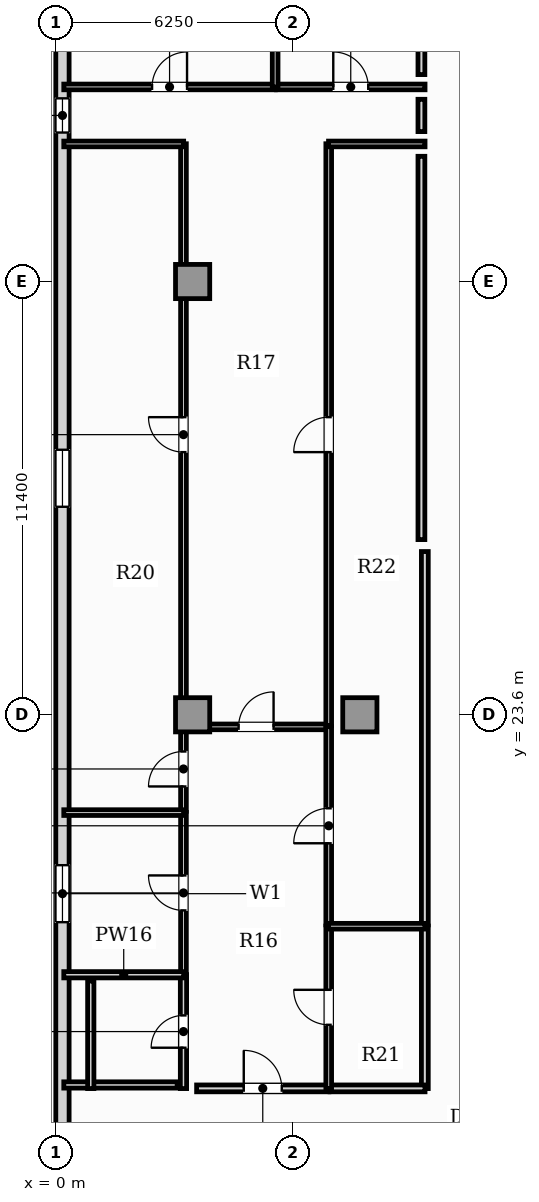
"""IFC4 building model, lengths in metres.
Left out: names, types, materials, properties, quantities, classifications, styles, units other than length and angle.
Written with IfcOpenShell. Run it as: python <this file> out.ifc"""

import sys

from ifc_helpers import new_model, si_unit, direction, frame, frame_2d, origin, origin_2d, place, context, subcontext, project, spatial, rectangle, extrude, element, fill, save


model = new_model("IFC4")
c1 = context("Model", 3, precision=1e-05, world=origin(), true_north=direction((0.0, 1.0)))
c2 = subcontext(c1, "Body", "Model", "MODEL_VIEW")
j1 = project(units=[si_unit("LENGTHUNIT", "METRE"), si_unit("PLANEANGLEUNIT", "RADIAN")], contexts=[c1])
p1 = place(None, origin())
s1 = spatial("IfcSite", under=j1, at=p1, CompositionType="ELEMENT")
p2 = place(p1, origin())
s2 = spatial("IfcBuilding", under=s1, at=p2, CompositionType="ELEMENT")
p3 = place(p2, frame((0.0, 0.0, 81.05)))
s3 = spatial("IfcBuildingStorey", under=s2, at=p3, CompositionType="ELEMENT", Elevation=81.05)
for number, where, z_axis, x_axis in (
    (1, (3.6, 23.6, 0.0), (0.0, 0.0, 1.0), (1.0, 0.0, 0.0)),
    (2, (8.0, 23.6, 0.0), (0.0, 0.0, 1.0), (1.0, 0.0, 0.0)),
    (3, (3.6, 35.0, 0.0), (0.0, 0.0, 1.0), (1.0, 0.0, 0.0)),
):
    element("IfcColumn", number, at=place(p3, frame(where, z_axis=z_axis, x_axis=x_axis)), inside=s3, PredefinedType="COLUMN", context=c2, shape_type="SweptSolid", body=[
        extrude(rectangle(XDim=0.9, YDim=0.9, at=origin_2d()), origin(), (0.0, 0.0, 1.0), 3.85),
    ])
p4 = place(p3, frame((0.175, 43.16, 0.0), z_axis=(0.0, 0.0, 1.0), x_axis=(0.0, -1.0, 0.0)))
e4 = element("IfcWall", 4, at=p4, inside=s3, PredefinedType="SOLIDWALL", context=c2, shape_type="SweptSolid", body=[
    extrude(rectangle(XDim=39.92, YDim=0.35, at=frame_2d((19.96, 0.0))), origin(), (0.0, 0.0, 1.0), 3.6),
])
p5 = place(p4, frame((3.34, 0.0, 0.95)))
e5 = element("IfcOpeningElement", 5, at=p5, cuts=e4, PredefinedType="OPENING", context=c2, shape_type="SweptSolid", body=[
    extrude(rectangle(XDim=0.9, YDim=1.5, at=frame_2d((0.45, 0.75))), frame((0.0, 0.185, 0.0), z_axis=(0.0, -1.0, 0.0), x_axis=(1.0, 0.0, 0.0)), (0.0, 0.0, 1.0), 0.37),
])
p6 = place(p4, frame((23.517, 0.0, 0.9)))
e6 = element("IfcOpeningElement", 6, at=p6, cuts=e4, PredefinedType="OPENING", context=c2, shape_type="SweptSolid", body=[
    extrude(rectangle(XDim=1.5, YDim=1.95, at=frame_2d((0.75, 0.975))), frame((0.0, 0.185, 0.0), z_axis=(0.0, -1.0, 0.0), x_axis=(1.0, 0.0, 0.0)), (0.0, 0.0, 1.0), 0.37),
])
p7 = place(p4, frame((12.587, 0.0, 0.9)))
e7 = element("IfcOpeningElement", 7, at=p7, cuts=e4, PredefinedType="OPENING", context=c2, shape_type="SweptSolid", body=[
    extrude(rectangle(XDim=1.5, YDim=1.95, at=frame_2d((0.75, 0.975))), frame((0.0, 0.185, 0.0), z_axis=(0.0, -1.0, 0.0), x_axis=(1.0, 0.0, 0.0)), (0.0, 0.0, 1.0), 0.37),
])
p8 = place(p3, frame((3.705, 13.77, 0.0), z_axis=(0.0, 0.0, 1.0), x_axis=(1.0, 0.0, 0.0)))
e8 = element("IfcWall", 8, at=p8, inside=s3, PredefinedType="PARTITIONING", context=c2, shape_type="SweptSolid", body=[
    extrude(rectangle(XDim=3.481, YDim=0.18, at=frame_2d((1.74, 0.0))), origin(), (0.0, 0.0, 1.0), 3.6),
])
p9 = place(p8, frame((1.24, 0.0, 0.0)))
e9 = element("IfcOpeningElement", 9, at=p9, cuts=e8, PredefinedType="OPENING", context=c2, shape_type="SweptSolid", body=[
    extrude(rectangle(XDim=1.0, YDim=2.15, at=frame_2d((0.5, 1.075))), frame((0.0, 0.1, 0.0), z_axis=(0.0, -1.0, 0.0), x_axis=(1.0, 0.0, 0.0)), (0.0, 0.0, 1.0), 0.2),
])
p10 = place(p3, frame((9.71, 13.765, 0.0), z_axis=(0.0, 0.0, 1.0), x_axis=(0.0, 1.0, 0.0)))
e10 = element("IfcWall", 10, at=p10, inside=s3, PredefinedType="PARTITIONING", context=c2, shape_type="SweptSolid", body=[
    extrude(rectangle(XDim=4.277, YDim=0.18, at=frame_2d((2.138, 0.0))), origin(), (0.0, 0.0, 1.0), 3.6),
])
p11 = place(p3, frame((7.216, 13.77, 0.0), z_axis=(0.0, 0.0, 1.0), x_axis=(1.0, 0.0, 0.0)))
e11 = element("IfcWall", 11, at=p11, inside=s3, PredefinedType="PARTITIONING", context=c2, shape_type="SweptSolid", body=[
    extrude(rectangle(XDim=2.499, YDim=0.18, at=frame_2d((1.25, 0.0))), origin(), (0.0, 0.0, 1.0), 3.6),
])
p12 = place(p3, frame((9.71, 18.072, 0.0), z_axis=(0.0, 0.0, 1.0), x_axis=(0.0, 1.0, 0.0)))
e12 = element("IfcWall", 12, at=p12, inside=s3, PredefinedType="PARTITIONING", context=c2, shape_type="SweptSolid", body=[
    extrude(rectangle(XDim=9.823, YDim=0.18, at=frame_2d((4.912, 0.0))), origin(), (0.0, 0.0, 1.0), 3.6),
])
p13 = place(p3, frame((3.354, 23.282, 0.0), z_axis=(0.0, 0.0, 1.0), x_axis=(1.0, 0.0, 0.0)))
e13 = element("IfcWall", 13, at=p13, inside=s3, PredefinedType="PARTITIONING", context=c2, shape_type="SweptSolid", body=[
    extrude(rectangle(XDim=3.832, YDim=0.15, at=frame_2d((1.916, 0.0))), origin(), (0.0, 0.0, 1.0), 3.6),
])
p14 = place(p13, frame((1.456, 0.0, 0.0)))
e14 = element("IfcOpeningElement", 14, at=p14, cuts=e13, PredefinedType="OPENING", context=c2, shape_type="SweptSolid", body=[
    extrude(rectangle(XDim=0.92, YDim=2.1, at=frame_2d((0.46, 1.05))), frame((0.0, 0.085, 0.0), z_axis=(0.0, -1.0, 0.0), x_axis=(1.0, 0.0, 0.0)), (0.0, 0.0, 1.0), 0.17),
])
p15 = place(p3, frame((3.359, 13.765, 0.0), z_axis=(0.0, 0.0, 1.0), x_axis=(0.0, 1.0, 0.0)))
e15 = element("IfcWall", 15, at=p15, inside=s3, PredefinedType="PLUMBINGWALL", context=c2, shape_type="SweptSolid", body=[
    extrude(rectangle(XDim=3.0, YDim=0.165, at=frame_2d((1.5, 0.0))), origin(), (0.0, 0.0, 1.0), 3.6),
])
p16 = place(p15, frame((1.075, 0.0, 0.0)))
e16 = element("IfcOpeningElement", 16, at=p16, cuts=e15, PredefinedType="OPENING", context=c2, shape_type="SweptSolid", body=[
    extrude(rectangle(XDim=0.85, YDim=2.1, at=frame_2d((0.425, 1.05))), frame((0.0, 0.093, 0.0), z_axis=(0.0, -1.0, 0.0), x_axis=(1.0, 0.0, 0.0)), (0.0, 0.0, 1.0), 0.185),
])
p17 = place(p3, frame((3.359, 16.795, 0.0), z_axis=(0.0, 0.0, 1.0), x_axis=(0.0, 1.0, 0.0)))
e17 = element("IfcWall", 17, at=p17, inside=s3, PredefinedType="PARTITIONING", context=c2, shape_type="SweptSolid", body=[
    extrude(rectangle(XDim=4.237, YDim=0.15, at=frame_2d((2.118, 0.0))), origin(), (0.0, 0.0, 1.0), 3.6),
])
p18 = place(p17, frame((1.658, 0.0, 0.0)))
e18 = element("IfcOpeningElement", 18, at=p18, cuts=e17, PredefinedType="OPENING", context=c2, shape_type="SweptSolid", body=[
    extrude(rectangle(XDim=0.92, YDim=2.1, at=frame_2d((0.46, 1.05))), frame((0.0, 0.085, 0.0), z_axis=(0.0, -1.0, 0.0), x_axis=(1.0, 0.0, 0.0)), (0.0, 0.0, 1.0), 0.17),
])
p19 = place(p3, frame((3.359, 21.062, 0.0), z_axis=(0.0, 0.0, 1.0), x_axis=(0.0, 1.0, 0.0)))
e19 = element("IfcWall", 19, at=p19, inside=s3, PredefinedType="PARTITIONING", context=c2, shape_type="SweptSolid", body=[
    extrude(rectangle(XDim=2.226, YDim=0.15, at=frame_2d((1.113, 0.0))), origin(), (0.0, 0.0, 1.0), 3.6),
])
p20 = place(p19, frame((0.653, 0.0, 0.0)))
e20 = element("IfcOpeningElement", 20, at=p20, cuts=e19, PredefinedType="OPENING", context=c2, shape_type="SweptSolid", body=[
    extrude(rectangle(XDim=0.92, YDim=2.1, at=frame_2d((0.46, 1.05))), frame((0.0, 0.085, 0.0), z_axis=(0.0, -1.0, 0.0), x_axis=(1.0, 0.0, 0.0)), (0.0, 0.0, 1.0), 0.17),
])
p21 = place(p3, frame((7.181, 13.765, 0.0), z_axis=(0.0, 0.0, 1.0), x_axis=(0.0, 1.0, 0.0)))
e21 = element("IfcWall", 21, at=p21, inside=s3, PredefinedType="PARTITIONING", context=c2, shape_type="SweptSolid", body=[
    extrude(rectangle(XDim=4.277, YDim=0.15, at=frame_2d((2.138, 0.0))), origin(), (0.0, 0.0, 1.0), 3.6),
])
p22 = place(p21, frame((1.678, 0.0, 0.0)))
e22 = element("IfcOpeningElement", 22, at=p22, cuts=e21, PredefinedType="OPENING", context=c2, shape_type="SweptSolid", body=[
    extrude(rectangle(XDim=0.92, YDim=2.1, at=frame_2d((0.46, 1.05))), frame((0.0, 0.085, 0.0), z_axis=(0.0, -1.0, 0.0), x_axis=(1.0, 0.0, 0.0)), (0.0, 0.0, 1.0), 0.17),
])
p23 = place(p3, frame((7.181, 18.072, 0.0), z_axis=(0.0, 0.0, 1.0), x_axis=(0.0, 1.0, 0.0)))
e23 = element("IfcWall", 23, at=p23, inside=s3, PredefinedType="PARTITIONING", context=c2, shape_type="SweptSolid", body=[
    extrude(rectangle(XDim=5.215, YDim=0.15, at=frame_2d((2.608, 0.0))), origin(), (0.0, 0.0, 1.0), 3.6),
])
p24 = place(p23, frame((2.148, 0.0, 0.0)))
e24 = element("IfcOpeningElement", 24, at=p24, cuts=e23, PredefinedType="OPENING", context=c2, shape_type="SweptSolid", body=[
    extrude(rectangle(XDim=0.92, YDim=2.1, at=frame_2d((0.46, 1.05))), frame((0.0, 0.085, 0.0), z_axis=(0.0, -1.0, 0.0), x_axis=(1.0, 0.0, 0.0)), (0.0, 0.0, 1.0), 0.17),
])
p25 = place(p3, frame((3.359, 23.317, 0.0), z_axis=(0.0, 0.0, 1.0), x_axis=(0.0, 1.0, 0.0)))
e25 = element("IfcWall", 25, at=p25, inside=s3, PredefinedType="PARTITIONING", context=c2, shape_type="SweptSolid", body=[
    extrude(rectangle(XDim=15.308, YDim=0.15, at=frame_2d((7.654, 0.0))), origin(), (0.0, 0.0, 1.0), 3.6),
])
p26 = place(p25, frame((7.194, 0.0, 0.0)))
e26 = element("IfcOpeningElement", 26, at=p26, cuts=e25, PredefinedType="OPENING", context=c2, shape_type="SweptSolid", body=[
    extrude(rectangle(XDim=0.92, YDim=2.1, at=frame_2d((0.46, 1.05))), frame((0.0, 0.085, 0.0), z_axis=(0.0, -1.0, 0.0), x_axis=(1.0, 0.0, 0.0)), (0.0, 0.0, 1.0), 0.17),
])
p27 = place(p3, frame((0.21, 38.62, 0.0), z_axis=(0.0, 0.0, 1.0), x_axis=(1.0, 0.0, 0.0)))
e27 = element("IfcWall", 27, at=p27, inside=s3, PredefinedType="PARTITIONING", context=c2, shape_type="SweptSolid", body=[
    extrude(rectangle(XDim=3.154, YDim=0.15, at=frame_2d((1.577, 0.0))), origin(), (0.0, 0.0, 1.0), 3.6),
])
p28 = place(p3, frame((7.181, 23.317, 0.0), z_axis=(0.0, 0.0, 1.0), x_axis=(0.0, 1.0, 0.0)))
e28 = element("IfcWall", 28, at=p28, inside=s3, PredefinedType="PARTITIONING", context=c2, shape_type="SweptSolid", body=[
    extrude(rectangle(XDim=15.308, YDim=0.15, at=frame_2d((7.654, 0.0))), origin(), (0.0, 0.0, 1.0), 3.6),
])
p29 = place(p28, frame((7.194, 0.0, 0.0)))
e29 = element("IfcOpeningElement", 29, at=p29, cuts=e28, PredefinedType="OPENING", context=c2, shape_type="SweptSolid", body=[
    extrude(rectangle(XDim=0.92, YDim=2.1, at=frame_2d((0.46, 1.05))), frame((0.0, 0.085, 0.0), z_axis=(0.0, -1.0, 0.0), x_axis=(1.0, 0.0, 0.0)), (0.0, 0.0, 1.0), 0.17),
])
p30 = place(p3, frame((7.176, 38.62, 0.0), z_axis=(0.0, 0.0, 1.0), x_axis=(1.0, 0.0, 0.0)))
e30 = element("IfcWall", 30, at=p30, inside=s3, PredefinedType="PARTITIONING", context=c2, shape_type="SweptSolid", body=[
    extrude(rectangle(XDim=2.539, YDim=0.15, at=frame_2d((1.27, 0.0))), origin(), (0.0, 0.0, 1.0), 3.6),
])
p31 = place(p3, frame((0.21, 40.12, 0.0), z_axis=(0.0, 0.0, 1.0), x_axis=(1.0, 0.0, 0.0)))
e31 = element("IfcWall", 31, at=p31, inside=s3, PredefinedType="PARTITIONING", context=c2, shape_type="SweptSolid", body=[
    extrude(rectangle(XDim=5.566, YDim=0.15, at=frame_2d((2.783, 0.0))), origin(), (0.0, 0.0, 1.0), 3.6),
])
p32 = place(p31, frame((2.323, 0.0, 0.0)))
e32 = element("IfcOpeningElement", 32, at=p32, cuts=e31, PredefinedType="OPENING", context=c2, shape_type="SweptSolid", body=[
    extrude(rectangle(XDim=0.92, YDim=2.1, at=frame_2d((0.46, 1.05))), frame((0.0, 0.085, 0.0), z_axis=(0.0, -1.0, 0.0), x_axis=(1.0, 0.0, 0.0)), (0.0, 0.0, 1.0), 0.17),
])
p33 = place(p3, frame((5.806, 40.12, 0.0), z_axis=(0.0, 0.0, 1.0), x_axis=(1.0, 0.0, 0.0)))
e33 = element("IfcWall", 33, at=p33, inside=s3, PredefinedType="PARTITIONING", context=c2, shape_type="SweptSolid", body=[
    extrude(rectangle(XDim=3.909, YDim=0.15, at=frame_2d((1.955, 0.0))), origin(), (0.0, 0.0, 1.0), 3.6),
])
p34 = place(p33, frame((1.494, 0.0, 0.0)))
e34 = element("IfcOpeningElement", 34, at=p34, cuts=e33, PredefinedType="OPENING", context=c2, shape_type="SweptSolid", body=[
    extrude(rectangle(XDim=0.92, YDim=2.1, at=frame_2d((0.46, 1.05))), frame((0.0, 0.085, 0.0), z_axis=(0.0, -1.0, 0.0), x_axis=(1.0, 0.0, 0.0)), (0.0, 0.0, 1.0), 0.17),
])
p35 = place(p3, frame((0.21, 16.76, 0.0), z_axis=(0.0, 0.0, 1.0), x_axis=(1.0, 0.0, 0.0)))
e35 = element("IfcWall", 35, at=p35, inside=s3, PredefinedType="PLUMBINGWALL", context=c2, shape_type="SweptSolid", body=[
    extrude(rectangle(XDim=3.154, YDim=0.165, at=frame_2d((1.577, 0.0))), origin(), (0.0, 0.0, 1.0), 3.6),
])
p36 = place(p3, frame((0.21, 21.027, 0.0), z_axis=(0.0, 0.0, 1.0), x_axis=(1.0, 0.0, 0.0)))
e36 = element("IfcWall", 36, at=p36, inside=s3, PredefinedType="PARTITIONING", context=c2, shape_type="SweptSolid", body=[
    extrude(rectangle(XDim=3.154, YDim=0.15, at=frame_2d((1.577, 0.0))), origin(), (0.0, 0.0, 1.0), 3.6),
])
p37 = place(p3, frame((7.176, 18.037, 0.0), z_axis=(0.0, 0.0, 1.0), x_axis=(1.0, 0.0, 0.0)))
e37 = element("IfcWall", 37, at=p37, inside=s3, PredefinedType="PARTITIONING", context=c2, shape_type="SweptSolid", body=[
    extrude(rectangle(XDim=2.539, YDim=0.15, at=frame_2d((1.27, 0.0))), origin(), (0.0, 0.0, 1.0), 3.6),
])
p38 = place(p3, frame((5.771, 40.115, 0.0), z_axis=(0.0, 0.0, 1.0), x_axis=(0.0, 1.0, 0.0)))
e38 = element("IfcWall", 38, at=p38, inside=s3, PredefinedType="PARTITIONING", context=c2, shape_type="SweptSolid", body=[
    extrude(rectangle(XDim=6.075, YDim=0.15, at=frame_2d((3.038, 0.0))), origin(), (0.0, 0.0, 1.0), 3.6),
])
p39 = place(p3, frame((9.62, 39.795, 0.0), z_axis=(0.0, 0.0, 1.0), x_axis=(0.0, -1.0, 0.0)))
e39 = element("IfcWall", 39, at=p39, inside=s3, PredefinedType="PARTITIONING", context=c2, shape_type="SweptSolid", body=[
    extrude(rectangle(XDim=0.85, YDim=0.18, at=frame_2d((0.425, 0.0))), origin(), (0.0, 0.0, 1.0), 3.6),
])
p40 = place(p3, frame((3.194, 13.86, 0.0), z_axis=(0.0, 0.0, 1.0), x_axis=(-1.0, 0.0, 0.0)))
e40 = element("IfcWall", 40, at=p40, inside=s3, PredefinedType="PLUMBINGWALL", context=c2, shape_type="SweptSolid", body=[
    extrude(rectangle(XDim=2.984, YDim=0.165, at=frame_2d((1.492, 0.0))), origin(), (0.0, 0.0, 1.0), 3.6),
])
p41 = place(p3, frame((0.92, 13.765, 0.0), z_axis=(0.0, 0.0, 1.0), x_axis=(0.0, 1.0, 0.0)))
e41 = element("IfcWall", 41, at=p41, inside=s3, PredefinedType="PLUMBINGWALL", context=c2, shape_type="SweptSolid", body=[
    extrude(rectangle(XDim=2.83, YDim=0.165, at=frame_2d((1.415, 0.0))), origin(), (0.0, 0.0, 1.0), 3.6),
])
p42 = place(p3, frame((9.62, 38.295, 0.0), z_axis=(0.0, 0.0, 1.0), x_axis=(0.0, -1.0, 0.0)))
e42 = element("IfcWall", 42, at=p42, inside=s3, PredefinedType="PARTITIONING", context=c2, shape_type="SweptSolid", body=[
    extrude(rectangle(XDim=10.085, YDim=0.18, at=frame_2d((5.042, 0.0))), origin(), (0.0, 0.0, 1.0), 3.6),
])
p43 = place(p3, frame((9.62, 46.19, 0.0), z_axis=(0.0, 0.0, 1.0), x_axis=(0.0, -1.0, 0.0)))
e43 = element("IfcWall", 43, at=p43, inside=s3, PredefinedType="PARTITIONING", context=c2, shape_type="SweptSolid", body=[
    extrude(rectangle(XDim=5.745, YDim=0.18, at=frame_2d((2.873, 0.0))), origin(), (0.0, 0.0, 1.0), 3.6),
])
p44 = place(p5, origin())
e44 = element("IfcWindow", 44, at=p44, inside=s3, PartitioningType="SINGLE_PANEL", PredefinedType="WINDOW", context=c2, shape_type="SweptSolid", body=[
    extrude(rectangle(XDim=0.9, YDim=1.5, at=frame_2d((0.45, 0.75))), frame((0.0, 0.03, 0.0), z_axis=(0.0, -1.0, 0.0), x_axis=(1.0, 0.0, 0.0)), (0.0, 0.0, 1.0), 0.06),
])
fill(e5, e44)
p45 = place(p6, origin())
e45 = element("IfcWindow", 45, at=p45, inside=s3, PartitioningType="SINGLE_PANEL", PredefinedType="WINDOW", context=c2, shape_type="SweptSolid", body=[
    extrude(rectangle(XDim=1.5, YDim=1.95, at=frame_2d((0.75, 0.975))), frame((0.0, 0.03, 0.0), z_axis=(0.0, -1.0, 0.0), x_axis=(1.0, 0.0, 0.0)), (0.0, 0.0, 1.0), 0.06),
])
fill(e6, e45)
p46 = place(p7, origin())
e46 = element("IfcWindow", 46, at=p46, inside=s3, PartitioningType="SINGLE_PANEL", PredefinedType="WINDOW", context=c2, shape_type="SweptSolid", body=[
    extrude(rectangle(XDim=1.5, YDim=1.95, at=frame_2d((0.75, 0.975))), frame((0.0, 0.03, 0.0), z_axis=(0.0, -1.0, 0.0), x_axis=(1.0, 0.0, 0.0)), (0.0, 0.0, 1.0), 0.06),
])
fill(e7, e46)
p47 = place(p9, origin())
e47 = element("IfcDoor", 47, at=p47, inside=s3, OperationType="SINGLE_SWING_LEFT", PredefinedType="DOOR", context=c2, shape_type="SweptSolid", body=[
    extrude(rectangle(XDim=1.0, YDim=2.15, at=frame_2d((0.5, 1.075))), frame((0.0, 0.025, 0.0), z_axis=(0.0, -1.0, 0.0), x_axis=(1.0, 0.0, 0.0)), (0.0, 0.0, 1.0), 0.05),
])
fill(e9, e47)
p48 = place(p14, origin())
e48 = element("IfcDoor", 48, at=p48, inside=s3, OperationType="SINGLE_SWING_RIGHT", PredefinedType="DOOR", context=c2, shape_type="SweptSolid", body=[
    extrude(rectangle(XDim=0.92, YDim=2.1, at=frame_2d((0.46, 1.05))), frame((0.0, 0.025, 0.0), z_axis=(0.0, -1.0, 0.0), x_axis=(1.0, 0.0, 0.0)), (0.0, 0.0, 1.0), 0.05),
])
fill(e14, e48)
p49 = place(p16, origin())
e49 = element("IfcDoor", 49, at=p49, inside=s3, OperationType="SINGLE_SWING_LEFT", PredefinedType="DOOR", context=c2, shape_type="SweptSolid", body=[
    extrude(rectangle(XDim=0.85, YDim=2.1, at=frame_2d((0.425, 1.05))), frame((0.0, 0.025, 0.0), z_axis=(0.0, -1.0, 0.0), x_axis=(1.0, 0.0, 0.0)), (0.0, 0.0, 1.0), 0.05),
])
fill(e16, e49)
p50 = place(p18, origin())
e50 = element("IfcDoor", 50, at=p50, inside=s3, OperationType="SINGLE_SWING_RIGHT", PredefinedType="DOOR", context=c2, shape_type="SweptSolid", body=[
    extrude(rectangle(XDim=0.92, YDim=2.1, at=frame_2d((0.46, 1.05))), frame((0.0, 0.025, 0.0), z_axis=(0.0, -1.0, 0.0), x_axis=(1.0, 0.0, 0.0)), (0.0, 0.0, 1.0), 0.05),
])
fill(e18, e50)
p51 = place(p20, origin())
e51 = element("IfcDoor", 51, at=p51, inside=s3, OperationType="SINGLE_SWING_LEFT", PredefinedType="DOOR", context=c2, shape_type="SweptSolid", body=[
    extrude(rectangle(XDim=0.92, YDim=2.1, at=frame_2d((0.46, 1.05))), frame((0.0, 0.025, 0.0), z_axis=(0.0, -1.0, 0.0), x_axis=(1.0, 0.0, 0.0)), (0.0, 0.0, 1.0), 0.05),
])
fill(e20, e51)
p52 = place(p22, origin())
e52 = element("IfcDoor", 52, at=p52, inside=s3, OperationType="SINGLE_SWING_RIGHT", PredefinedType="DOOR", context=c2, shape_type="SweptSolid", body=[
    extrude(rectangle(XDim=0.92, YDim=2.1, at=frame_2d((0.46, 1.05))), frame((0.0, 0.025, 0.0), z_axis=(0.0, -1.0, 0.0), x_axis=(1.0, 0.0, 0.0)), (0.0, 0.0, 1.0), 0.05),
])
fill(e22, e52)
p53 = place(p24, origin())
e53 = element("IfcDoor", 53, at=p53, inside=s3, OperationType="SINGLE_SWING_LEFT", PredefinedType="DOOR", context=c2, shape_type="SweptSolid", body=[
    extrude(rectangle(XDim=0.92, YDim=2.1, at=frame_2d((0.46, 1.05))), frame((0.0, 0.025, 0.0), z_axis=(0.0, -1.0, 0.0), x_axis=(1.0, 0.0, 0.0)), (0.0, 0.0, 1.0), 0.05),
])
fill(e24, e53)
p54 = place(p26, origin())
e54 = element("IfcDoor", 54, at=p54, inside=s3, OperationType="SINGLE_SWING_RIGHT", PredefinedType="DOOR", context=c2, shape_type="SweptSolid", body=[
    extrude(rectangle(XDim=0.92, YDim=2.1, at=frame_2d((0.46, 1.05))), frame((0.0, 0.025, 0.0), z_axis=(0.0, -1.0, 0.0), x_axis=(1.0, 0.0, 0.0)), (0.0, 0.0, 1.0), 0.05),
])
fill(e26, e54)
p55 = place(p29, origin())
e55 = element("IfcDoor", 55, at=p55, inside=s3, OperationType="SINGLE_SWING_LEFT", PredefinedType="DOOR", context=c2, shape_type="SweptSolid", body=[
    extrude(rectangle(XDim=0.92, YDim=2.1, at=frame_2d((0.46, 1.05))), frame((0.0, 0.025, 0.0), z_axis=(0.0, -1.0, 0.0), x_axis=(1.0, 0.0, 0.0)), (0.0, 0.0, 1.0), 0.05),
])
fill(e29, e55)
p56 = place(p32, origin())
e56 = element("IfcDoor", 56, at=p56, inside=s3, OperationType="SINGLE_SWING_RIGHT", PredefinedType="DOOR", context=c2, shape_type="SweptSolid", body=[
    extrude(rectangle(XDim=0.92, YDim=2.1, at=frame_2d((0.46, 1.05))), frame((0.0, 0.025, 0.0), z_axis=(0.0, -1.0, 0.0), x_axis=(1.0, 0.0, 0.0)), (0.0, 0.0, 1.0), 0.05),
])
fill(e32, e56)
p57 = place(p34, origin())
e57 = element("IfcDoor", 57, at=p57, inside=s3, OperationType="SINGLE_SWING_LEFT", PredefinedType="DOOR", context=c2, shape_type="SweptSolid", body=[
    extrude(rectangle(XDim=0.92, YDim=2.1, at=frame_2d((0.46, 1.05))), frame((0.0, 0.025, 0.0), z_axis=(0.0, -1.0, 0.0), x_axis=(1.0, 0.0, 0.0)), (0.0, 0.0, 1.0), 0.05),
])
fill(e34, e57)
save(model, sys.argv[1])
